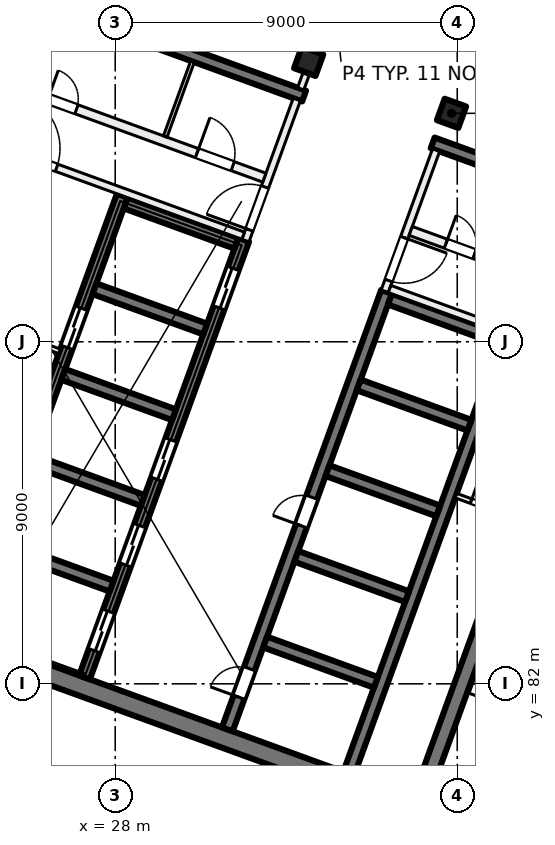
"""IFC4 building model, lengths in metres.
Left out: names, types, materials, properties, quantities, classifications, styles, units other than length and angle.
Written with IfcOpenShell. Run it as: python <this file> out.ifc"""

import sys

from ifc_helpers import new_model, si_unit, direction, frame, frame_2d, origin, origin_2d, place, context, subcontext, project, spatial, rectangle, extrude, element, fill, save


model = new_model("IFC4")
c1 = context("Model", 3, precision=1e-05, world=origin(), true_north=direction((0.0, 1.0)))
c2 = subcontext(c1, "Body", "Model", "MODEL_VIEW")
j1 = project(units=[si_unit("LENGTHUNIT", "METRE"), si_unit("PLANEANGLEUNIT", "RADIAN")], contexts=[c1])
p1 = place(None, origin())
s1 = spatial("IfcSite", under=j1, at=p1, CompositionType="ELEMENT")
p2 = place(p1, origin())
s2 = spatial("IfcBuilding", under=s1, at=p2, CompositionType="ELEMENT")
p3 = place(p2, frame((0.0, 0.0, 192.0)))
s3 = spatial("IfcBuildingStorey", under=s2, at=p3, CompositionType="ELEMENT", Elevation=192.0)
for number, where, z_axis, x_axis in (
    (1, (36.849, 97.011, 0.0), (0.0, 0.0, 1.0), (-0.342, -0.94, 0.0)),
    (2, (33.091, 98.379, 0.0), (0.0, 0.0, 1.0), (-0.342, -0.94, 0.0)),
):
    element("IfcColumn", number, at=place(p3, frame(where, z_axis=z_axis, x_axis=x_axis)), inside=s3, PredefinedType="COLUMN", context=c2, shape_type="SweptSolid", body=[
        extrude(rectangle(XDim=0.6, YDim=0.6, at=origin_2d()), origin(), (0.0, 0.0, 1.0), 4.0),
    ])
p4 = place(p3, frame((35.75, 78.788, 0.0), z_axis=(0.0, 0.0, 1.0), x_axis=(-0.939692894512, 0.342019391267, 0.0)))
e3 = element("IfcWall", 3, at=p4, inside=s3, PredefinedType="SHEAR", context=c2, shape_type="SweptSolid", body=[
    extrude(rectangle(XDim=14.4, YDim=0.5, at=frame_2d((7.2, 0.0))), origin(), (0.0, 0.0, 1.0), 4.0),
])
p5 = place(p3, frame((36.058, 79.048, 0.0), z_axis=(0.0, 0.0, 1.0), x_axis=(0.342016982193, 0.939693771338, 0.0)))
e4 = element("IfcWall", 4, at=p5, inside=s3, PredefinedType="SHEAR", context=c2, shape_type="SweptSolid", body=[
    extrude(rectangle(XDim=7.8, YDim=0.4, at=frame_2d((3.9, 0.0))), origin(), (0.0, 0.0, 1.0), 4.0),
])
p6 = place(p3, frame((30.949, 80.801, 0.0), z_axis=(0.0, 0.0, 1.0), x_axis=(0.342016684409, 0.939693879721, 0.0)))
e5 = element("IfcWall", 5, at=p6, inside=s3, PredefinedType="SHEAR", context=c2, shape_type="SweptSolid", body=[
    extrude(rectangle(XDim=12.25, YDim=0.3, at=frame_2d((6.125, 0.0))), origin(), (0.0, 0.0, 1.0), 4.0),
])
p7 = place(p6, frame((0.9, 0.0, 0.0)))
e6 = element("IfcOpeningElement", 6, at=p7, cuts=e5, PredefinedType="OPENING", context=c2, shape_type="SweptSolid", body=[
    extrude(rectangle(XDim=0.8, YDim=2.1, at=frame_2d((0.4, 1.05))), frame((0.0, 0.16, 0.0), z_axis=(0.0, -1.0, 0.0), x_axis=(1.0, 0.0, 0.0)), (0.0, 0.0, 1.0), 0.32),
])
p8 = place(p6, frame((5.7, 0.0, 0.0)))
e7 = element("IfcOpeningElement", 7, at=p8, cuts=e5, PredefinedType="OPENING", context=c2, shape_type="SweptSolid", body=[
    extrude(rectangle(XDim=0.8, YDim=2.1, at=frame_2d((0.4, 1.05))), frame((0.0, 0.16, 0.0), z_axis=(0.0, -1.0, 0.0), x_axis=(1.0, 0.0, 0.0)), (0.0, 0.0, 1.0), 0.32),
])
p9 = place(p3, frame((34.144, 79.638, 0.0), z_axis=(0.0, 0.0, 1.0), x_axis=(0.342016684409, 0.939693879721, 0.0)))
e8 = element("IfcWall", 8, at=p9, inside=s3, PredefinedType="SHEAR", context=c2, shape_type="SweptSolid", body=[
    extrude(rectangle(XDim=12.25, YDim=0.3, at=frame_2d((6.125, 0.0))), origin(), (0.0, 0.0, 1.0), 4.0),
])
p10 = place(p3, frame((34.858, 82.039, 0.0), z_axis=(0.0, 0.0, 1.0), x_axis=(-0.939689908313, 0.342027595692, 0.0)))
e9 = element("IfcWall", 9, at=p10, inside=s3, PredefinedType="SHEAR", context=c2, shape_type="SweptSolid", body=[
    extrude(rectangle(XDim=3.1, YDim=0.3, at=frame_2d((1.55, 0.0))), origin(), (0.0, 0.0, 1.0), 4.0),
])
p11 = place(p3, frame((35.679, 84.294, 0.0), z_axis=(0.0, 0.0, 1.0), x_axis=(-0.939706007505, 0.341983361377, 0.0)))
e10 = element("IfcWall", 10, at=p11, inside=s3, PredefinedType="SHEAR", context=c2, shape_type="SweptSolid", body=[
    extrude(rectangle(XDim=3.1, YDim=0.3, at=frame_2d((1.55, 0.0))), origin(), (0.0, 0.0, 1.0), 4.0),
])
for number, where, z_axis, x_axis in (
    (11, (36.5, 86.549, 0.0), (0.0, 0.0, 1.0), (-0.94, 0.342, 0.0)),
    (12, (37.321, 88.805, 0.0), (0.0, 0.0, 1.0), (-0.94, 0.342, 0.0)),
    (13, (38.142, 91.06, 0.0), (0.0, 0.0, 1.0), (-0.94, 0.342, 0.0)),
):
    element("IfcWall", number, at=place(p3, frame(where, z_axis=z_axis, x_axis=x_axis)), inside=s3, PredefinedType="SHEAR", context=c2, shape_type="SweptSolid", body=[
        extrude(rectangle(XDim=3.1, YDim=0.3, at=frame_2d((1.55, 0.0))), origin(), (0.0, 0.0, 1.0), 4.0),
    ])
p12 = place(p3, frame((27.191, 82.169, 0.0), z_axis=(0.0, 0.0, 1.0), x_axis=(0.342016684409, 0.939693879721, 0.0)))
e14 = element("IfcWall", 14, at=p12, inside=s3, PredefinedType="SHEAR", context=c2, shape_type="SweptSolid", body=[
    extrude(rectangle(XDim=12.25, YDim=0.3, at=frame_2d((6.125, 0.0))), origin(), (0.0, 0.0, 1.0), 4.0),
])
p13 = place(p12, frame((0.75, 0.0, 0.0)))
e15 = element("IfcOpeningElement", 15, at=p13, cuts=e14, PredefinedType="OPENING", context=c2, shape_type="SweptSolid", body=[
    extrude(rectangle(XDim=1.1, YDim=2.1, at=frame_2d((0.55, 1.05))), frame((0.0, 0.16, 0.0), z_axis=(0.0, -1.0, 0.0), x_axis=(1.0, 0.0, 0.0)), (0.0, 0.0, 1.0), 0.32),
])
p14 = place(p12, frame((3.15, 0.0, 0.0)))
e16 = element("IfcOpeningElement", 16, at=p14, cuts=e14, PredefinedType="OPENING", context=c2, shape_type="SweptSolid", body=[
    extrude(rectangle(XDim=1.1, YDim=2.1, at=frame_2d((0.55, 1.05))), frame((0.0, 0.16, 0.0), z_axis=(0.0, -1.0, 0.0), x_axis=(1.0, 0.0, 0.0)), (0.0, 0.0, 1.0), 0.32),
])
p15 = place(p12, frame((5.55, 0.0, 0.0)))
e17 = element("IfcOpeningElement", 17, at=p15, cuts=e14, PredefinedType="OPENING", context=c2, shape_type="SweptSolid", body=[
    extrude(rectangle(XDim=1.1, YDim=2.1, at=frame_2d((0.55, 1.05))), frame((0.0, 0.16, 0.0), z_axis=(0.0, -1.0, 0.0), x_axis=(1.0, 0.0, 0.0)), (0.0, 0.0, 1.0), 0.32),
])
p16 = place(p12, frame((10.35, 0.0, 0.0)))
e18 = element("IfcOpeningElement", 18, at=p16, cuts=e14, PredefinedType="OPENING", context=c2, shape_type="SweptSolid", body=[
    extrude(rectangle(XDim=1.1, YDim=2.1, at=frame_2d((0.55, 1.05))), frame((0.0, 0.16, 0.0), z_axis=(0.0, -1.0, 0.0), x_axis=(1.0, 0.0, 0.0)), (0.0, 0.0, 1.0), 0.32),
])
p17 = place(p3, frame((23.996, 83.332, 0.0), z_axis=(0.0, 0.0, 1.0), x_axis=(0.342016684409, 0.939693879721, 0.0)))
e19 = element("IfcWall", 19, at=p17, inside=s3, PredefinedType="SHEAR", context=c2, shape_type="SweptSolid", body=[
    extrude(rectangle(XDim=12.25, YDim=0.3, at=frame_2d((6.125, 0.0))), origin(), (0.0, 0.0, 1.0), 4.0),
])
p18 = place(p17, frame((8.0, 0.0, 0.0)))
e20 = element("IfcOpeningElement", 20, at=p18, cuts=e19, PredefinedType="OPENING", context=c2, shape_type="SweptSolid", body=[
    extrude(rectangle(XDim=1.1, YDim=2.1, at=frame_2d((0.55, 1.05))), frame((0.0, 0.16, 0.0), z_axis=(0.0, -1.0, 0.0), x_axis=(1.0, 0.0, 0.0)), (0.0, 0.0, 1.0), 0.32),
])
for number, where, z_axis, x_axis in (
    (21, (27.905, 84.57, 0.0), (0.0, 0.0, 1.0), (-0.94, 0.342, 0.0)),
    (22, (28.726, 86.825, 0.0), (0.0, 0.0, 1.0), (-0.94, 0.342, 0.0)),
    (23, (29.546, 89.08, 0.0), (0.0, 0.0, 1.0), (-0.94, 0.342, 0.0)),
):
    element("IfcWall", number, at=place(p3, frame(where, z_axis=z_axis, x_axis=x_axis)), inside=s3, PredefinedType="SHEAR", context=c2, shape_type="SweptSolid", body=[
        extrude(rectangle(XDim=3.1, YDim=0.3, at=frame_2d((1.55, 0.0))), origin(), (0.0, 0.0, 1.0), 4.0),
    ])
for number, where, z_axis, x_axis in (
    (24, (30.367, 91.336, 0.0), (0.0, 0.0, 1.0), (-0.94, 0.342, 0.0)),
    (25, (31.188, 93.591, 0.0), (0.0, 0.0, 1.0), (-0.94, 0.342, 0.0)),
):
    element("IfcWall", number, at=place(p3, frame(where, z_axis=z_axis, x_axis=x_axis)), inside=s3, PredefinedType="SHEAR", context=c2, shape_type="SweptSolid", body=[
        extrude(rectangle(XDim=3.1, YDim=0.3, at=frame_2d((1.55, 0.0))), origin(), (0.0, 0.0, 1.0), 4.0),
    ])
p19 = place(p3, frame((44.529, 93.258, 0.0), z_axis=(0.0, 0.0, 1.0), x_axis=(-0.9396917844, 0.342022441267, 0.0)))
e26 = element("IfcWall", 26, at=p19, inside=s3, PredefinedType="SHEAR", context=c2, shape_type="SweptSolid", body=[
    extrude(rectangle(XDim=8.7, YDim=0.3, at=frame_2d((4.35, 0.0))), origin(), (0.0, 0.0, 1.0), 4.0),
])
p20 = place(p3, frame((32.971, 97.465, 0.0), z_axis=(0.0, 0.0, 1.0), x_axis=(-0.939695066972, 0.34201342241, 0.0)))
e27 = element("IfcWall", 27, at=p20, inside=s3, PredefinedType="SHEAR", context=c2, shape_type="SweptSolid", body=[
    extrude(rectangle(XDim=8.7, YDim=0.3, at=frame_2d((4.35, 0.0))), origin(), (0.0, 0.0, 1.0), 4.0),
])
p21 = place(p3, frame((31.427, 93.663, 0.0), z_axis=(0.0, 0.0, 1.0), x_axis=(0.342030870568, 0.93968871632, 0.0)))
e28 = element("IfcWall", 28, at=p21, inside=s3, PredefinedType="PARTITIONING", context=c2, shape_type="SweptSolid", body=[
    extrude(rectangle(XDim=3.95, YDim=0.2, at=frame_2d((1.975, 0.0))), origin(), (0.0, 0.0, 1.0), 3.625),
])
p22 = place(p21, frame((0.3, 0.0, 0.0)))
e29 = element("IfcOpeningElement", 29, at=p22, cuts=e28, PredefinedType="OPENING", context=c2, shape_type="SweptSolid", body=[
    extrude(rectangle(XDim=1.2, YDim=2.1, at=frame_2d((0.6, 1.05))), frame((0.0, 0.11, 0.0), z_axis=(0.0, -1.0, 0.0), x_axis=(1.0, 0.0, 0.0)), (0.0, 0.0, 1.0), 0.22),
])
p23 = place(p3, frame((23.427, 96.682, 0.0), z_axis=(0.0, 0.0, 1.0), x_axis=(0.939690465531, -0.342026064782, 0.0)))
e30 = element("IfcWall", 30, at=p23, inside=s3, PredefinedType="PARTITIONING", context=c2, shape_type="SweptSolid", body=[
    extrude(rectangle(XDim=8.45, YDim=0.2, at=frame_2d((4.225, 0.0))), origin(), (0.0, 0.0, 1.0), 3.625),
])
p24 = place(p23, frame((1.725, 0.0, 0.0)))
e31 = element("IfcOpeningElement", 31, at=p24, cuts=e30, PredefinedType="OPENING", context=c2, shape_type="SweptSolid", body=[
    extrude(rectangle(XDim=1.5, YDim=2.1, at=frame_2d((0.75, 1.05))), frame((0.0, 0.11, 0.0), z_axis=(0.0, -1.0, 0.0), x_axis=(1.0, 0.0, 0.0)), (0.0, 0.0, 1.0), 0.22),
])
p25 = place(p3, frame((23.983, 98.208, 0.0), z_axis=(0.0, 0.0, 1.0), x_axis=(0.939699751196, -0.342000552051, 0.0)))
e32 = element("IfcWall", 32, at=p25, inside=s3, PredefinedType="PARTITIONING", context=c2, shape_type="SweptSolid", body=[
    extrude(rectangle(XDim=8.45, YDim=0.25, at=frame_2d((4.225, 0.0))), origin(), (0.0, 0.0, 1.0), 3.625),
])
p26 = place(p25, frame((6.565, 0.0, 0.0)))
e33 = element("IfcOpeningElement", 33, at=p26, cuts=e32, PredefinedType="OPENING", context=c2, shape_type="SweptSolid", body=[
    extrude(rectangle(XDim=1.0, YDim=2.1, at=frame_2d((0.5, 1.05))), frame((0.0, 0.135, 0.0), z_axis=(0.0, -1.0, 0.0), x_axis=(1.0, 0.0, 0.0)), (0.0, 0.0, 1.0), 0.27),
])
p27 = place(p25, frame((2.39, 0.0, 0.0)))
e34 = element("IfcOpeningElement", 34, at=p27, cuts=e32, PredefinedType="OPENING", context=c2, shape_type="SweptSolid", body=[
    extrude(rectangle(XDim=0.8, YDim=2.1, at=frame_2d((0.4, 1.05))), frame((0.0, 0.135, 0.0), z_axis=(0.0, -1.0, 0.0), x_axis=(1.0, 0.0, 0.0)), (0.0, 0.0, 1.0), 0.27),
])
p28 = place(p3, frame((24.985, 91.312, 0.0), z_axis=(0.0, 0.0, 1.0), x_axis=(0.939719959755, -0.341945020783, 0.0)))
e35 = element("IfcWall", 35, at=p28, inside=s3, PredefinedType="PARTITIONING", context=c2, shape_type="SweptSolid", body=[
    extrude(rectangle(XDim=1.65, YDim=0.125, at=frame_2d((0.825, 0.0))), origin(), (0.0, 0.0, 1.0), 3.625),
])
p29 = place(p28, frame((0.425, 0.0, 0.0)))
e36 = element("IfcOpeningElement", 36, at=p29, cuts=e35, PredefinedType="OPENING", context=c2, shape_type="SweptSolid", body=[
    extrude(rectangle(XDim=0.8, YDim=2.1, at=frame_2d((0.4, 1.05))), frame((0.0, 0.073, 0.0), z_axis=(0.0, -1.0, 0.0), x_axis=(1.0, 0.0, 0.0)), (0.0, 0.0, 1.0), 0.145),
])
p30 = place(p3, frame((29.316, 96.4, 0.0), z_axis=(0.0, 0.0, 1.0), x_axis=(0.342023078919, 0.939691552312, 0.0)))
e37 = element("IfcWall", 37, at=p30, inside=s3, PredefinedType="PARTITIONING", context=c2, shape_type="SweptSolid", body=[
    extrude(rectangle(XDim=2.1, YDim=0.1, at=frame_2d((1.05, 0.0))), origin(), (0.0, 0.0, 1.0), 3.625),
])
p31 = place(p3, frame((36.443, 96.041, 0.0), z_axis=(0.0, 0.0, 1.0), x_axis=(-0.341996156931, -0.939701350773, 0.0)))
e38 = element("IfcWall", 38, at=p31, inside=s3, PredefinedType="PARTITIONING", context=c2, shape_type="SweptSolid", body=[
    extrude(rectangle(XDim=3.95, YDim=0.2, at=frame_2d((1.975, 0.0))), origin(), (0.0, 0.0, 1.0), 3.625),
])
p32 = place(p31, frame((2.45, 0.0, 0.0)))
e39 = element("IfcOpeningElement", 39, at=p32, cuts=e38, PredefinedType="OPENING", context=c2, shape_type="SweptSolid", body=[
    extrude(rectangle(XDim=1.2, YDim=2.1, at=frame_2d((0.6, 1.05))), frame((0.0, 0.11, 0.0), z_axis=(0.0, -1.0, 0.0), x_axis=(1.0, 0.0, 0.0)), (0.0, 0.0, 1.0), 0.22),
])
p33 = place(p3, frame((35.22, 92.389, 0.0), z_axis=(0.0, 0.0, 1.0), x_axis=(0.939690465531, -0.342026064782, 0.0)))
e40 = element("IfcWall", 40, at=p33, inside=s3, PredefinedType="PARTITIONING", context=c2, shape_type="SweptSolid", body=[
    extrude(rectangle(XDim=8.45, YDim=0.2, at=frame_2d((4.225, 0.0))), origin(), (0.0, 0.0, 1.0), 3.625),
])
p34 = place(p33, frame((5.225, 0.0, 0.0)))
e41 = element("IfcOpeningElement", 41, at=p34, cuts=e40, PredefinedType="OPENING", context=c2, shape_type="SweptSolid", body=[
    extrude(rectangle(XDim=1.5, YDim=2.1, at=frame_2d((0.75, 1.05))), frame((0.0, 0.11, 0.0), z_axis=(0.0, -1.0, 0.0), x_axis=(1.0, 0.0, 0.0)), (0.0, 0.0, 1.0), 0.22),
])
p35 = place(p3, frame((35.776, 93.916, 0.0), z_axis=(0.0, 0.0, 1.0), x_axis=(0.939690465531, -0.342026064782, 0.0)))
e42 = element("IfcWall", 42, at=p35, inside=s3, PredefinedType="PARTITIONING", context=c2, shape_type="SweptSolid", body=[
    extrude(rectangle(XDim=8.45, YDim=0.25, at=frame_2d((4.225, 0.0))), origin(), (0.0, 0.0, 1.0), 3.625),
])
p36 = place(p35, frame((0.985, 0.0, 0.0)))
e43 = element("IfcOpeningElement", 43, at=p36, cuts=e42, PredefinedType="OPENING", context=c2, shape_type="SweptSolid", body=[
    extrude(rectangle(XDim=0.8, YDim=2.1, at=frame_2d((0.4, 1.05))), frame((0.0, 0.135, 0.0), z_axis=(0.0, -1.0, 0.0), x_axis=(1.0, 0.0, 0.0)), (0.0, 0.0, 1.0), 0.27),
])
p37 = place(p35, frame((5.16, 0.0, 0.0)))
e44 = element("IfcOpeningElement", 44, at=p37, cuts=e42, PredefinedType="OPENING", context=c2, shape_type="SweptSolid", body=[
    extrude(rectangle(XDim=1.0, YDim=2.1, at=frame_2d((0.5, 1.05))), frame((0.0, 0.135, 0.0), z_axis=(0.0, -1.0, 0.0), x_axis=(1.0, 0.0, 0.0)), (0.0, 0.0, 1.0), 0.27),
])
p38 = place(p3, frame((36.966, 86.952, 0.0), z_axis=(0.0, 0.0, 1.0), x_axis=(0.939672407396, -0.342075674051, 0.0)))
e45 = element("IfcWall", 45, at=p38, inside=s3, PredefinedType="PARTITIONING", context=c2, shape_type="SweptSolid", body=[
    extrude(rectangle(XDim=1.65, YDim=0.125, at=frame_2d((0.825, 0.0))), origin(), (0.0, 0.0, 1.0), 3.625),
])
p39 = place(p38, frame((0.425, 0.0, 0.0)))
e46 = element("IfcOpeningElement", 46, at=p39, cuts=e45, PredefinedType="OPENING", context=c2, shape_type="SweptSolid", body=[
    extrude(rectangle(XDim=0.8, YDim=2.1, at=frame_2d((0.4, 1.05))), frame((0.0, 0.073, 0.0), z_axis=(0.0, -1.0, 0.0), x_axis=(1.0, 0.0, 0.0)), (0.0, 0.0, 1.0), 0.145),
])
p40 = place(p3, frame((32.881, 97.657, 0.0), z_axis=(0.0, 0.0, 1.0), x_axis=(0.342058204353, 0.939678766832, 0.0)))
e47 = element("IfcWall", 47, at=p40, inside=s3, PredefinedType="PARTITIONING", context=c2, shape_type="SweptSolid", body=[
    extrude(rectangle(XDim=5.163, YDim=0.175, at=frame_2d((2.581, 0.0))), origin(), (0.0, 0.0, 1.0), 3.625),
])
p41 = place(p40, frame((1.991, 0.0, 0.0)))
e48 = element("IfcOpeningElement", 48, at=p41, cuts=e47, PredefinedType="OPENING", context=c2, shape_type="SweptSolid", body=[
    extrude(rectangle(XDim=1.2, YDim=2.1, at=frame_2d((0.6, 1.05))), frame((0.0, 0.097, 0.0), z_axis=(0.0, -1.0, 0.0), x_axis=(1.0, 0.0, 0.0)), (0.0, 0.0, 1.0), 0.195),
])
p42 = place(p13, origin())
e49 = element("IfcDoor", 49, at=p42, inside=s3, OperationType="DOUBLE_DOOR_SLIDING", PredefinedType="DOOR", context=c2, shape_type="SweptSolid", body=[
    extrude(rectangle(XDim=1.1, YDim=2.1, at=frame_2d((0.55, 1.05))), frame((0.0, 0.025, 0.0), z_axis=(0.0, -1.0, 0.0), x_axis=(1.0, 0.0, 0.0)), (0.0, 0.0, 1.0), 0.05),
])
fill(e15, e49)
p43 = place(p14, origin())
e50 = element("IfcDoor", 50, at=p43, inside=s3, OperationType="DOUBLE_DOOR_SLIDING", PredefinedType="DOOR", context=c2, shape_type="SweptSolid", body=[
    extrude(rectangle(XDim=1.1, YDim=2.1, at=frame_2d((0.55, 1.05))), frame((0.0, 0.025, 0.0), z_axis=(0.0, -1.0, 0.0), x_axis=(1.0, 0.0, 0.0)), (0.0, 0.0, 1.0), 0.05),
])
fill(e16, e50)
p44 = place(p15, origin())
e51 = element("IfcDoor", 51, at=p44, inside=s3, OperationType="DOUBLE_DOOR_SLIDING", PredefinedType="DOOR", context=c2, shape_type="SweptSolid", body=[
    extrude(rectangle(XDim=1.1, YDim=2.1, at=frame_2d((0.55, 1.05))), frame((0.0, 0.025, 0.0), z_axis=(0.0, -1.0, 0.0), x_axis=(1.0, 0.0, 0.0)), (0.0, 0.0, 1.0), 0.05),
])
fill(e17, e51)
p45 = place(p16, origin())
e52 = element("IfcDoor", 52, at=p45, inside=s3, OperationType="DOUBLE_DOOR_SLIDING", PredefinedType="DOOR", context=c2, shape_type="SweptSolid", body=[
    extrude(rectangle(XDim=1.1, YDim=2.1, at=frame_2d((0.55, 1.05))), frame((0.0, 0.025, 0.0), z_axis=(0.0, -1.0, 0.0), x_axis=(1.0, 0.0, 0.0)), (0.0, 0.0, 1.0), 0.05),
])
fill(e18, e52)
p46 = place(p7, origin())
e53 = element("IfcDoor", 53, at=p46, inside=s3, OperationType="SINGLE_SWING_LEFT", PredefinedType="DOOR", context=c2, shape_type="SweptSolid", body=[
    extrude(rectangle(XDim=0.8, YDim=2.1, at=frame_2d((0.4, 1.05))), frame((0.0, 0.025, 0.0), z_axis=(0.0, -1.0, 0.0), x_axis=(1.0, 0.0, 0.0)), (0.0, 0.0, 1.0), 0.05),
])
fill(e6, e53)
p47 = place(p8, origin())
e54 = element("IfcDoor", 54, at=p47, inside=s3, OperationType="SINGLE_SWING_RIGHT", PredefinedType="DOOR", context=c2, shape_type="SweptSolid", body=[
    extrude(rectangle(XDim=0.8, YDim=2.1, at=frame_2d((0.4, 1.05))), frame((0.0, 0.025, 0.0), z_axis=(0.0, -1.0, 0.0), x_axis=(1.0, 0.0, 0.0)), (0.0, 0.0, 1.0), 0.05),
])
fill(e7, e54)
p48 = place(p22, origin())
e55 = element("IfcDoor", 55, at=p48, inside=s3, OperationType="DOUBLE_DOOR_SINGLE_SWING", PredefinedType="DOOR", context=c2, shape_type="SweptSolid", body=[
    extrude(rectangle(XDim=1.2, YDim=2.1, at=frame_2d((0.6, 1.05))), frame((0.0, 0.025, 0.0), z_axis=(0.0, -1.0, 0.0), x_axis=(1.0, 0.0, 0.0)), (0.0, 0.0, 1.0), 0.05),
])
fill(e29, e55)
p49 = place(p24, origin())
e56 = element("IfcDoor", 56, at=p49, inside=s3, OperationType="DOUBLE_DOOR_SINGLE_SWING", PredefinedType="DOOR", context=c2, shape_type="SweptSolid", body=[
    extrude(rectangle(XDim=1.5, YDim=2.1, at=frame_2d((0.75, 1.05))), frame((0.0, 0.025, 0.0), z_axis=(0.0, -1.0, 0.0), x_axis=(1.0, 0.0, 0.0)), (0.0, 0.0, 1.0), 0.05),
])
fill(e31, e56)
p50 = place(p26, origin())
e57 = element("IfcDoor", 57, at=p50, inside=s3, OperationType="SINGLE_SWING_LEFT", PredefinedType="DOOR", context=c2, shape_type="SweptSolid", body=[
    extrude(rectangle(XDim=1.0, YDim=2.1, at=frame_2d((0.5, 1.05))), frame((0.0, 0.025, 0.0), z_axis=(0.0, -1.0, 0.0), x_axis=(1.0, 0.0, 0.0)), (0.0, 0.0, 1.0), 0.05),
])
fill(e33, e57)
p51 = place(p27, origin())
e58 = element("IfcDoor", 58, at=p51, inside=s3, OperationType="SINGLE_SWING_RIGHT", PredefinedType="DOOR", context=c2, shape_type="SweptSolid", body=[
    extrude(rectangle(XDim=0.8, YDim=2.1, at=frame_2d((0.4, 1.05))), frame((0.0, 0.025, 0.0), z_axis=(0.0, -1.0, 0.0), x_axis=(1.0, 0.0, 0.0)), (0.0, 0.0, 1.0), 0.05),
])
fill(e34, e58)
p52 = place(p32, origin())
e59 = element("IfcDoor", 59, at=p52, inside=s3, OperationType="DOUBLE_DOOR_SINGLE_SWING", PredefinedType="DOOR", context=c2, shape_type="SweptSolid", body=[
    extrude(rectangle(XDim=1.2, YDim=2.1, at=frame_2d((0.6, 1.05))), frame((0.0, 0.025, 0.0), z_axis=(0.0, -1.0, 0.0), x_axis=(1.0, 0.0, 0.0)), (0.0, 0.0, 1.0), 0.05),
])
fill(e39, e59)
p53 = place(p39, origin())
e60 = element("IfcDoor", 60, at=p53, inside=s3, OperationType="SINGLE_SWING_LEFT", PredefinedType="DOOR", context=c2, shape_type="SweptSolid", body=[
    extrude(rectangle(XDim=0.8, YDim=2.1, at=frame_2d((0.4, 1.05))), frame((0.0, 0.025, 0.0), z_axis=(0.0, -1.0, 0.0), x_axis=(1.0, 0.0, 0.0)), (0.0, 0.0, 1.0), 0.05),
])
fill(e46, e60)
p54 = place(p36, origin())
e61 = element("IfcDoor", 61, at=p54, inside=s3, OperationType="SINGLE_SWING_RIGHT", PredefinedType="DOOR", context=c2, shape_type="SweptSolid", body=[
    extrude(rectangle(XDim=0.8, YDim=2.1, at=frame_2d((0.4, 1.05))), frame((0.0, 0.025, 0.0), z_axis=(0.0, -1.0, 0.0), x_axis=(1.0, 0.0, 0.0)), (0.0, 0.0, 1.0), 0.05),
])
fill(e43, e61)
p55 = place(p18, origin())
e62 = element("IfcDoor", 62, at=p55, inside=s3, OperationType="DOUBLE_DOOR_SLIDING", PredefinedType="DOOR", context=c2, shape_type="SweptSolid", body=[
    extrude(rectangle(XDim=1.1, YDim=2.1, at=frame_2d((0.55, 1.05))), frame((0.0, 0.025, 0.0), z_axis=(0.0, -1.0, 0.0), x_axis=(1.0, 0.0, 0.0)), (0.0, 0.0, 1.0), 0.05),
])
fill(e20, e62)
save(model, sys.argv[1])
